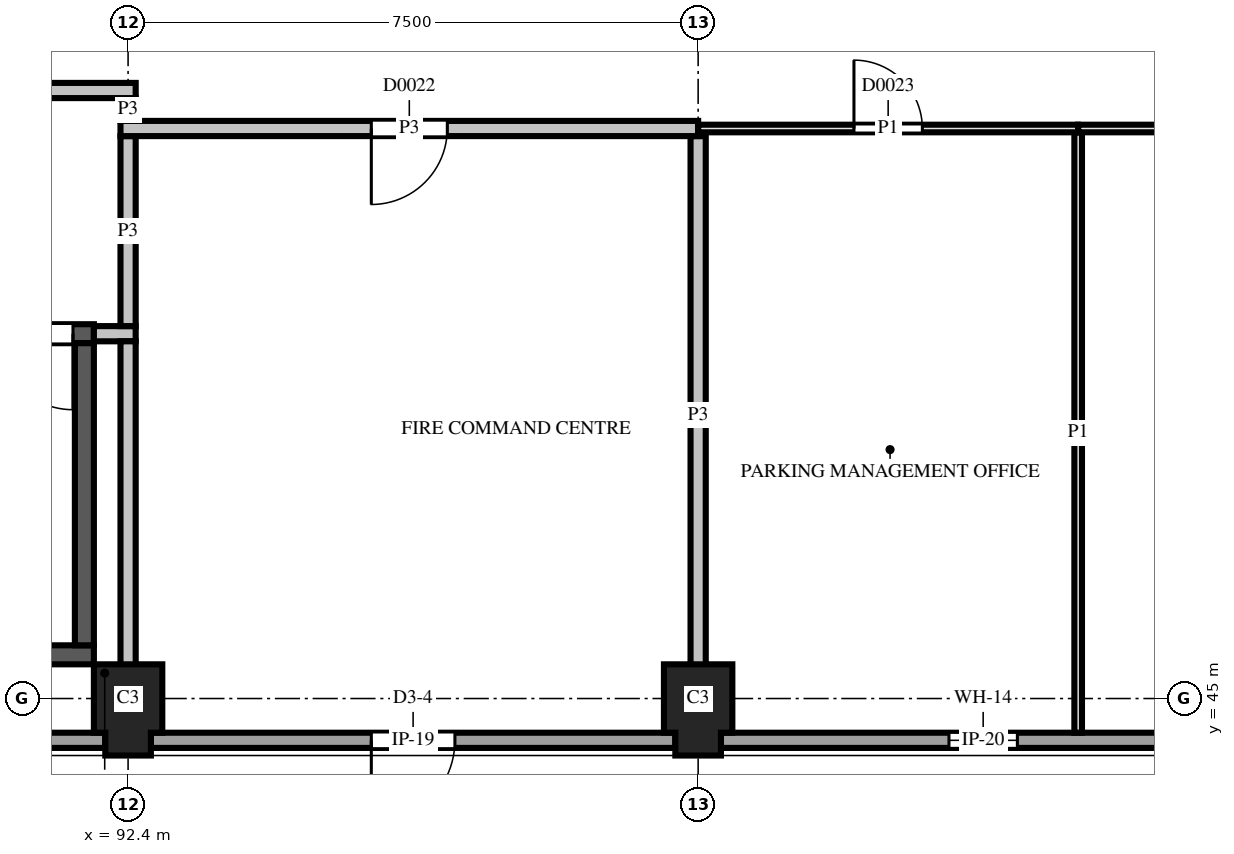
"""IFC4 building model, lengths in metres.
Left out: names, types, materials, properties, quantities, classifications, styles, units other than length and angle.
Written with IfcOpenShell. Run it as: python <this file> out.ifc"""

import sys

from ifc_helpers import new_model, si_unit, direction, frame, frame_2d, origin, place, context, subcontext, project, spatial, polyline, rectangle, outline, extrude, element, fill, save


model = new_model("IFC4")
c1 = context("Model", 3, precision=1e-05, world=origin(), true_north=direction((0.0, 1.0)))
c2 = subcontext(c1, "Body", "Model", "MODEL_VIEW")
j1 = project(units=[si_unit("LENGTHUNIT", "METRE"), si_unit("PLANEANGLEUNIT", "RADIAN")], contexts=[c1])
p1 = place(None, origin())
s1 = spatial("IfcSite", under=j1, at=p1, CompositionType="ELEMENT")
p2 = place(p1, origin())
s2 = spatial("IfcBuilding", under=s1, at=p2, CompositionType="ELEMENT")
p3 = place(p2, origin())
s3 = spatial("IfcBuildingStorey", under=s2, at=p3, CompositionType="ELEMENT", Elevation=0.0)
for number, where, z_axis, x_axis in (
    (1, (92.4, 45.0, 0.0), (0.0, 0.0, 1.0), (0.0, -1.0, 0.0)),
    (2, (99.9, 45.0, 0.0), (0.0, 0.0, 1.0), (0.0, -1.0, 0.0)),
):
    element("IfcColumn", number, at=place(p3, frame(where, z_axis=z_axis, x_axis=x_axis)), inside=s3, PredefinedType="COLUMN", context=c2, shape_type="SweptSolid", body=[
        extrude(outline(polyline([(-0.45, -0.45), (0.45, -0.45), (0.45, -0.3), (0.75, -0.3), (0.75, 0.3), (0.45, 0.3), (0.45, 0.45), (-0.45, 0.45), (-0.45, -0.45)])), origin(), (0.0, 0.0, 1.0), 4.5),
    ])
p4 = place(p3, frame((86.2, 45.575, 0.0), z_axis=(0.0, 0.0, 1.0), x_axis=(1.0, 0.0, 0.0)))
e3 = element("IfcWall", 3, at=p4, inside=s3, PredefinedType="SHEAR", context=c2, shape_type="SweptSolid", body=[
    extrude(rectangle(XDim=5.75, YDim=0.25, at=frame_2d((2.875, 0.0))), origin(), (0.0, 0.0, 1.0), 4.5),
])
p5 = place(p4, frame((3.6, 0.0, 0.0)))
e4 = element("IfcOpeningElement", 4, at=p5, cuts=e3, PredefinedType="OPENING", context=c2, shape_type="SweptSolid", body=[
    extrude(rectangle(XDim=1.1, YDim=2.1, at=frame_2d((0.55, 1.05))), frame((0.0, 0.135, 0.0), z_axis=(0.0, -1.0, 0.0), x_axis=(1.0, 0.0, 0.0)), (0.0, 0.0, 1.0), 0.27),
])
p6 = place(p3, frame((86.2, 49.8, 0.0), z_axis=(0.0, 0.0, 1.0), x_axis=(1.0, 0.0, 0.0)))
e5 = element("IfcWall", 5, at=p6, inside=s3, PredefinedType="SHEAR", context=c2, shape_type="SweptSolid", body=[
    extrude(rectangle(XDim=5.75, YDim=0.25, at=frame_2d((2.875, 0.0))), origin(), (0.0, 0.0, 1.0), 4.5),
])
p7 = place(p6, frame((4.475, 0.0, 0.0)))
e6 = element("IfcOpeningElement", 6, at=p7, cuts=e5, PredefinedType="OPENING", context=c2, shape_type="SweptSolid", body=[
    extrude(rectangle(XDim=1.0, YDim=2.1, at=frame_2d((0.5, 1.05))), frame((0.0, 0.135, 0.0), z_axis=(0.0, -1.0, 0.0), x_axis=(1.0, 0.0, 0.0)), (0.0, 0.0, 1.0), 0.27),
])
p8 = place(p3, frame((91.825, 45.7, 0.0), z_axis=(0.0, 0.0, 1.0), x_axis=(0.0, 1.0, 0.0)))
e7 = element("IfcWall", 7, at=p8, inside=s3, PredefinedType="SHEAR", context=c2, shape_type="SweptSolid", body=[
    extrude(rectangle(XDim=3.975, YDim=0.25, at=frame_2d((1.988, 0.0))), origin(), (0.0, 0.0, 1.0), 4.5),
])
p9 = place(p3, frame((85.2, 44.45, 0.0), z_axis=(0.0, 0.0, 1.0), x_axis=(1.0, 0.0, 0.0)))
e8 = element("IfcWall", 8, at=p9, inside=s3, PredefinedType="SOLIDWALL", context=c2, shape_type="SweptSolid", body=[
    extrude(outline(polyline([(0.0, 0.0), (6.9, 0.0), (6.9, 3.1), (6.002, 3.1), (6.0, 2.4), (5.681, 2.56), (5.363, 2.695), (5.044, 2.806), (4.725, 2.895), (4.406, 2.963), (4.087, 3.012), (3.769, 3.041), (3.45, 3.05), (3.131, 3.041), (2.812, 3.012), (2.494, 2.963), (2.175, 2.895), (1.856, 2.806), (1.538, 2.695), (1.219, 2.56), (0.9, 2.4), (0.898, 3.1), (0.0, 3.1), (0.0, 0.0)])), frame((0.0, 0.1, 0.0), z_axis=(0.0, -1.0, 0.0), x_axis=(1.0, 0.0, 0.0)), (0.0, 0.0, 1.0), 0.2),
])
p10 = place(p9, frame((4.6, 0.0, 0.0)))
e9 = element("IfcOpeningElement", 9, at=p10, cuts=e8, PredefinedType="OPENING", context=c2, shape_type="SweptSolid", body=[
    extrude(rectangle(XDim=1.1, YDim=2.1, at=frame_2d((0.55, 1.05))), frame((0.0, 0.11, 0.0), z_axis=(0.0, -1.0, 0.0), x_axis=(1.0, 0.0, 0.0)), (0.0, 0.0, 1.0), 0.22),
])
p11 = place(p3, frame((92.7, 44.45, 0.0), z_axis=(0.0, 0.0, 1.0), x_axis=(1.0, 0.0, 0.0)))
e10 = element("IfcWall", 10, at=p11, inside=s3, PredefinedType="SOLIDWALL", context=c2, shape_type="SweptSolid", body=[
    extrude(outline(polyline([(0.0, 0.0), (6.9, 0.0), (6.9, 3.1), (6.002, 3.1), (6.0, 2.4), (5.681, 2.56), (5.363, 2.695), (5.044, 2.806), (4.725, 2.895), (4.406, 2.963), (4.087, 3.012), (3.769, 3.041), (3.45, 3.05), (3.131, 3.041), (2.812, 3.012), (2.494, 2.963), (2.175, 2.895), (1.856, 2.806), (1.538, 2.695), (1.219, 2.56), (0.9, 2.4), (0.898, 3.1), (0.0, 3.1), (0.0, 0.0)])), frame((0.0, 0.1, 0.0), z_axis=(0.0, -1.0, 0.0), x_axis=(1.0, 0.0, 0.0)), (0.0, 0.0, 1.0), 0.2),
])
p12 = place(p11, frame((2.9, 0.0, 0.0)))
e11 = element("IfcOpeningElement", 11, at=p12, cuts=e10, PredefinedType="OPENING", context=c2, shape_type="SweptSolid", body=[
    extrude(rectangle(XDim=1.1, YDim=2.1, at=frame_2d((0.55, 1.05))), frame((0.0, 0.11, 0.0), z_axis=(0.0, -1.0, 0.0), x_axis=(1.0, 0.0, 0.0)), (0.0, 0.0, 1.0), 0.22),
])
p13 = place(p3, frame((100.2, 44.45, 0.0), z_axis=(0.0, 0.0, 1.0), x_axis=(1.0, 0.0, 0.0)))
e12 = element("IfcWall", 12, at=p13, inside=s3, PredefinedType="SOLIDWALL", context=c2, shape_type="SweptSolid", body=[
    extrude(outline(polyline([(0.0, 0.0), (6.9, 0.0), (6.9, 3.1), (6.002, 3.1), (6.0, 2.4), (5.681, 2.56), (5.363, 2.695), (5.044, 2.806), (4.725, 2.895), (4.406, 2.963), (4.087, 3.012), (3.769, 3.041), (3.45, 3.05), (3.131, 3.041), (2.812, 3.012), (2.494, 2.963), (2.175, 2.895), (1.856, 2.806), (1.538, 2.695), (1.219, 2.56), (0.9, 2.4), (0.898, 3.1), (0.0, 3.1), (0.0, 0.0)])), frame((0.0, 0.1, 0.0), z_axis=(0.0, -1.0, 0.0), x_axis=(1.0, 0.0, 0.0)), (0.0, 0.0, 1.0), 0.2),
])
p14 = place(p13, frame((3.0, 0.0, 2.4)))
e13 = element("IfcOpeningElement", 13, at=p14, cuts=e12, PredefinedType="OPENING", context=c2, shape_type="SweptSolid", body=[
    extrude(rectangle(XDim=0.9, YDim=0.531, at=frame_2d((0.45, 0.266))), frame((0.0, 0.11, 0.0), z_axis=(0.0, -1.0, 0.0), x_axis=(1.0, 0.0, 0.0)), (0.0, 0.0, 1.0), 0.22),
])
p15 = place(p3, frame((99.9, 45.06, 0.0), z_axis=(0.0, 0.0, 1.0), x_axis=(0.0, 1.0, 0.0)))
e14 = element("IfcWall", 14, at=p15, inside=s3, PredefinedType="PARTITIONING", context=c2, shape_type="SweptSolid", body=[
    extrude(rectangle(XDim=7.34, YDim=0.2, at=frame_2d((3.67, 0.0))), origin(), (0.0, 0.0, 1.0), 3.68),
])
p16 = place(p3, frame((104.9, 44.55, 0.0), z_axis=(0.0, 0.0, 1.0), x_axis=(0.0, 1.0, 0.0)))
e15 = element("IfcWall", 15, at=p16, inside=s3, PredefinedType="PARTITIONING", context=c2, shape_type="SweptSolid", body=[
    extrude(rectangle(XDim=7.9, YDim=0.1, at=frame_2d((3.95, 0.0))), origin(), (0.0, 0.0, 1.0), 3.68),
])
p17 = place(p3, frame((91.95, 49.8, 0.0), z_axis=(0.0, 0.0, 1.0), x_axis=(1.0, 0.0, 0.0)))
e16 = element("IfcWall", 16, at=p17, inside=s3, PredefinedType="PARTITIONING", context=c2, shape_type="SweptSolid", body=[
    extrude(rectangle(XDim=0.55, YDim=0.2, at=frame_2d((0.275, 0.0))), origin(), (0.0, 0.0, 1.0), 3.68),
])
p18 = place(p3, frame((92.4, 49.7, 0.0), z_axis=(0.0, 0.0, 1.0), x_axis=(0.0, -1.0, 0.0)))
e17 = element("IfcWall", 17, at=p18, inside=s3, PredefinedType="PARTITIONING", context=c2, shape_type="SweptSolid", body=[
    extrude(rectangle(XDim=4.64, YDim=0.2, at=frame_2d((2.32, 0.0))), origin(), (0.0, 0.0, 1.0), 3.68),
])
p19 = place(p3, frame((92.4, 49.9, 0.0), z_axis=(0.0, 0.0, 1.0), x_axis=(0.0, 1.0, 0.0)))
e18 = element("IfcWall", 18, at=p19, inside=s3, PredefinedType="PARTITIONING", context=c2, shape_type="SweptSolid", body=[
    extrude(rectangle(XDim=2.5, YDim=0.2, at=frame_2d((1.25, 0.0))), origin(), (0.0, 0.0, 1.0), 3.68),
])
p20 = place(p3, frame((92.4, 52.6, 0.0), z_axis=(0.0, 0.0, 1.0), x_axis=(0.0, 1.0, 0.0)))
e19 = element("IfcWall", 19, at=p20, inside=s3, PredefinedType="PARTITIONING", context=c2, shape_type="SweptSolid", body=[
    extrude(rectangle(XDim=0.3, YDim=0.2, at=frame_2d((0.15, 0.0))), origin(), (0.0, 0.0, 1.0), 3.68),
])
p21 = place(p3, frame((99.9, 52.5, 0.0), z_axis=(0.0, 0.0, 1.0), x_axis=(-1.0, 0.0, 0.0)))
e20 = element("IfcWall", 20, at=p21, inside=s3, PredefinedType="PARTITIONING", context=c2, shape_type="SweptSolid", body=[
    extrude(rectangle(XDim=7.6, YDim=0.2, at=frame_2d((3.8, 0.0))), origin(), (0.0, 0.0, 1.0), 3.68),
])
p22 = place(p21, frame((3.3, 0.0, 0.0)))
e21 = element("IfcOpeningElement", 21, at=p22, cuts=e20, PredefinedType="OPENING", context=c2, shape_type="SweptSolid", body=[
    extrude(rectangle(XDim=1.0, YDim=2.1, at=frame_2d((0.5, 1.05))), frame((0.0, 0.11, 0.0), z_axis=(0.0, -1.0, 0.0), x_axis=(1.0, 0.0, 0.0)), (0.0, 0.0, 1.0), 0.22),
])
p23 = place(p3, frame((104.9, 52.5, 0.0), z_axis=(0.0, 0.0, 1.0), x_axis=(-1.0, 0.0, 0.0)))
e22 = element("IfcWall", 22, at=p23, inside=s3, PredefinedType="PARTITIONING", context=c2, shape_type="SweptSolid", body=[
    extrude(rectangle(XDim=5.0, YDim=0.1, at=frame_2d((2.5, 0.0))), origin(), (0.0, 0.0, 1.0), 3.68),
])
p24 = place(p23, frame((2.05, 0.0, 0.0)))
e23 = element("IfcOpeningElement", 23, at=p24, cuts=e22, PredefinedType="OPENING", context=c2, shape_type="SweptSolid", body=[
    extrude(rectangle(XDim=0.9, YDim=2.1, at=frame_2d((0.45, 1.05))), frame((0.0, 0.06, 0.0), z_axis=(0.0, -1.0, 0.0), x_axis=(1.0, 0.0, 0.0)), (0.0, 0.0, 1.0), 0.12),
])
p25 = place(p3, frame((109.9, 52.5, 0.0), z_axis=(0.0, 0.0, 1.0), x_axis=(-1.0, 0.0, 0.0)))
e24 = element("IfcWall", 24, at=p25, inside=s3, PredefinedType="PARTITIONING", context=c2, shape_type="SweptSolid", body=[
    extrude(rectangle(XDim=5.0, YDim=0.1, at=frame_2d((2.5, 0.0))), origin(), (0.0, 0.0, 1.0), 3.68),
])
p26 = place(p25, frame((2.05, 0.0, 0.0)))
e25 = element("IfcOpeningElement", 25, at=p26, cuts=e24, PredefinedType="OPENING", context=c2, shape_type="SweptSolid", body=[
    extrude(rectangle(XDim=0.9, YDim=2.1, at=frame_2d((0.45, 1.05))), frame((0.0, 0.06, 0.0), z_axis=(0.0, -1.0, 0.0), x_axis=(1.0, 0.0, 0.0)), (0.0, 0.0, 1.0), 0.12),
])
p27 = place(p3, frame((92.5, 53.0, 0.0), z_axis=(0.0, 0.0, 1.0), x_axis=(-1.0, 0.0, 0.0)))
e26 = element("IfcWall", 26, at=p27, inside=s3, PredefinedType="PARTITIONING", context=c2, shape_type="SweptSolid", body=[
    extrude(rectangle(XDim=9.05, YDim=0.2, at=frame_2d((4.525, 0.0))), origin(), (0.0, 0.0, 1.0), 3.68),
])
p28 = place(p27, frame((4.025, 0.0, 0.0)))
e27 = element("IfcOpeningElement", 27, at=p28, cuts=e26, PredefinedType="OPENING", context=c2, shape_type="SweptSolid", body=[
    extrude(rectangle(XDim=1.0, YDim=2.1, at=frame_2d((0.5, 1.05))), frame((0.0, 0.11, 0.0), z_axis=(0.0, -1.0, 0.0), x_axis=(1.0, 0.0, 0.0)), (0.0, 0.0, 1.0), 0.22),
])
p29 = place(p12, frame((1.1, 0.0, 0.0), z_axis=(0.0, 0.0, 1.0), x_axis=(-1.0, 0.0, 0.0)))
e28 = element("IfcDoor", 28, at=p29, inside=s3, OperationType="SINGLE_SWING_LEFT", PredefinedType="DOOR", context=c2, shape_type="SweptSolid", body=[
    extrude(rectangle(XDim=1.1, YDim=2.1, at=frame_2d((0.55, 1.05))), frame((0.0, 0.025, 0.0), z_axis=(0.0, -1.0, 0.0), x_axis=(1.0, 0.0, 0.0)), (0.0, 0.0, 1.0), 0.05),
])
fill(e11, e28)
p30 = place(p14, origin())
e29 = element("IfcWindow", 29, at=p30, inside=s3, PartitioningType="SINGLE_PANEL", PredefinedType="WINDOW", context=c2, shape_type="SweptSolid", body=[
    extrude(rectangle(XDim=0.9, YDim=0.531, at=frame_2d((0.45, 0.266))), frame((0.0, 0.03, 0.0), z_axis=(0.0, -1.0, 0.0), x_axis=(1.0, 0.0, 0.0)), (0.0, 0.0, 1.0), 0.06),
])
fill(e13, e29)
p31 = place(p22, origin())
e30 = element("IfcDoor", 30, at=p31, inside=s3, OperationType="SINGLE_SWING_LEFT", PredefinedType="DOOR", context=c2, shape_type="SweptSolid", body=[
    extrude(rectangle(XDim=1.0, YDim=2.1, at=frame_2d((0.5, 1.05))), frame((0.0, 0.025, 0.0), z_axis=(0.0, -1.0, 0.0), x_axis=(1.0, 0.0, 0.0)), (0.0, 0.0, 1.0), 0.05),
])
fill(e21, e30)
p32 = place(p24, origin())
e31 = element("IfcDoor", 31, at=p32, inside=s3, OperationType="SINGLE_SWING_RIGHT", PredefinedType="DOOR", context=c2, shape_type="SweptSolid", body=[
    extrude(rectangle(XDim=0.9, YDim=2.1, at=frame_2d((0.45, 1.05))), frame((0.0, 0.025, 0.0), z_axis=(0.0, -1.0, 0.0), x_axis=(1.0, 0.0, 0.0)), (0.0, 0.0, 1.0), 0.05),
])
fill(e23, e31)
p33 = place(p7, origin())
e32 = element("IfcDoor", 32, at=p33, inside=s3, OperationType="SINGLE_SWING_RIGHT", PredefinedType="DOOR", context=c2, shape_type="SweptSolid", body=[
    extrude(rectangle(XDim=1.0, YDim=2.1, at=frame_2d((0.5, 1.05))), frame((0.0, 0.025, 0.0), z_axis=(0.0, -1.0, 0.0), x_axis=(1.0, 0.0, 0.0)), (0.0, 0.0, 1.0), 0.05),
])
fill(e6, e32)
save(model, sys.argv[1])
